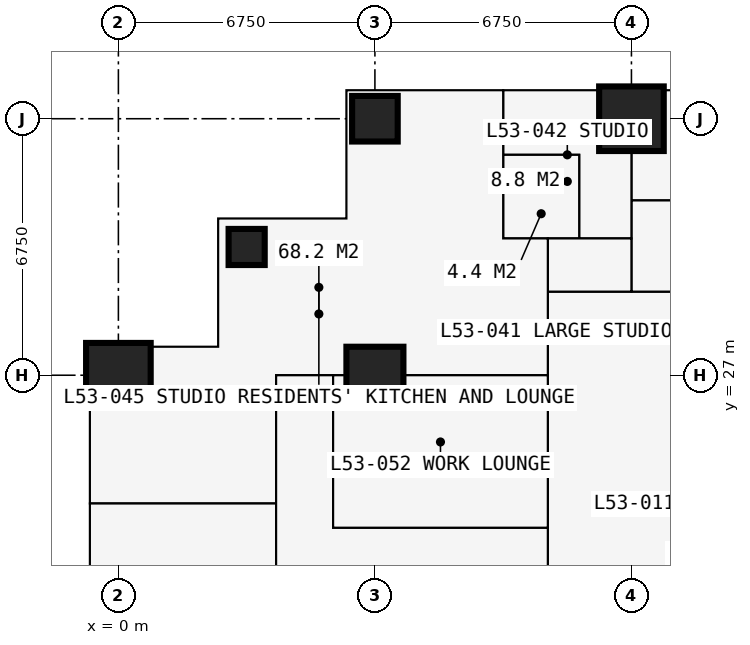
"""IFC4 building model, lengths in metres.
Left out: names, types, materials, properties, quantities, classifications, styles, units other than length and angle.
Written with IfcOpenShell. Run it as: python <this file> out.ifc"""

import sys

from ifc_helpers import new_model, si_unit, direction, frame, frame_2d, origin, origin_2d, place, context, subcontext, project, spatial, rectangle, extrude, element, fill, save


model = new_model("IFC4")
c1 = context("Model", 3, precision=1e-05, world=origin(), true_north=direction((0.0, 1.0)))
c2 = subcontext(c1, "Body", "Model", "MODEL_VIEW")
j1 = project(units=[si_unit("LENGTHUNIT", "METRE"), si_unit("PLANEANGLEUNIT", "RADIAN")], contexts=[c1])
p1 = place(None, origin())
s1 = spatial("IfcSite", under=j1, at=p1, CompositionType="ELEMENT")
p2 = place(p1, origin())
s2 = spatial("IfcBuilding", under=s1, at=p2, CompositionType="ELEMENT")
p3 = place(p2, frame((0.0, 0.0, 196.2)))
s3 = spatial("IfcBuildingStorey", under=s2, at=p3, CompositionType="ELEMENT", Elevation=196.2)
p4 = place(p3, frame((0.0, 27.0, 0.0), z_axis=(0.0, 0.0, 1.0), x_axis=(1.0, 0.0, 0.0)))
e1 = element("IfcColumn", 1, at=p4, inside=s3, PredefinedType="COLUMN", context=c2, shape_type="SweptSolid", body=[
    extrude(rectangle(XDim=1.7, YDim=1.7, at=origin_2d()), origin(), (0.0, 0.0, 1.0), 3.6),
])
p5 = place(p3, frame((3.375, 30.375, 0.0), z_axis=(0.0, 0.0, 1.0), x_axis=(1.0, 0.0, 0.0)))
e2 = element("IfcColumn", 2, at=p5, inside=s3, PredefinedType="COLUMN", context=c2, shape_type="SweptSolid", body=[
    extrude(rectangle(XDim=0.95, YDim=0.95, at=origin_2d()), origin(), (0.0, 0.0, 1.0), 3.6),
])
p6 = place(p3, frame((6.75, 27.0, 0.0), z_axis=(0.0, 0.0, 1.0), x_axis=(1.0, 0.0, 0.0)))
e3 = element("IfcColumn", 3, at=p6, inside=s3, PredefinedType="COLUMN", context=c2, shape_type="SweptSolid", body=[
    extrude(rectangle(XDim=1.5, YDim=1.5, at=origin_2d()), origin(), (0.0, 0.0, 1.0), 3.6),
])
p7 = place(p3, frame((6.75, 33.75, 0.0), z_axis=(0.0, 0.0, 1.0), x_axis=(1.0, 0.0, 0.0)))
e4 = element("IfcColumn", 4, at=p7, inside=s3, PredefinedType="COLUMN", context=c2, shape_type="SweptSolid", body=[
    extrude(rectangle(XDim=1.2, YDim=1.2, at=origin_2d()), origin(), (0.0, 0.0, 1.0), 3.6),
])
p8 = place(p3, frame((13.5, 33.75, 0.0), z_axis=(0.0, 0.0, 1.0), x_axis=(1.0, 0.0, 0.0)))
e5 = element("IfcColumn", 5, at=p8, inside=s3, PredefinedType="COLUMN", context=c2, shape_type="SweptSolid", body=[
    extrude(rectangle(XDim=1.7, YDim=1.7, at=origin_2d()), origin(), (0.0, 0.0, 1.0), 3.6),
])
p9 = place(p3, frame((27.4, 27.0, 0.0), z_axis=(0.0, 0.0, 1.0), x_axis=(-1.0, 0.0, 0.0)))
e6 = element("IfcWall", 6, at=p9, inside=s3, PredefinedType="SHEAR", context=c2, shape_type="SweptSolid", body=[
    extrude(rectangle(XDim=14.3, YDim=1.2, at=frame_2d((7.15, 0.0))), origin(), (0.0, 0.0, 1.0), 3.6),
])
p10 = place(p9, frame((5.225, 0.0, 0.0)))
e7 = element("IfcOpeningElement", 7, at=p10, cuts=e6, PredefinedType="OPENING", context=c2, shape_type="SweptSolid", body=[
    extrude(rectangle(XDim=0.9, YDim=2.2, at=frame_2d((0.45, 1.1))), frame((0.0, 0.61, 0.0), z_axis=(0.0, -1.0, 0.0), x_axis=(1.0, 0.0, 0.0)), (0.0, 0.0, 1.0), 1.22),
])
p11 = place(p9, frame((8.2, 0.0, 0.0)))
e8 = element("IfcOpeningElement", 8, at=p11, cuts=e6, PredefinedType="OPENING", context=c2, shape_type="SweptSolid", body=[
    extrude(rectangle(XDim=1.0, YDim=2.2, at=frame_2d((0.5, 1.1))), frame((0.0, 0.61, 0.0), z_axis=(0.0, -1.0, 0.0), x_axis=(1.0, 0.0, 0.0)), (0.0, 0.0, 1.0), 1.22),
])
p12 = place(p3, frame((13.6, 26.4, 0.0), z_axis=(0.0, 0.0, 1.0), x_axis=(0.0, -1.0, 0.0)))
e9 = element("IfcWall", 9, at=p12, inside=s3, PredefinedType="SHEAR", context=c2, shape_type="SweptSolid", body=[
    extrude(rectangle(XDim=12.3, YDim=1.0, at=frame_2d((6.15, 0.0))), origin(), (0.0, 0.0, 1.0), 3.6),
])
p13 = place(p12, frame((7.45, 0.0, 0.0)))
e10 = element("IfcOpeningElement", 10, at=p13, cuts=e9, PredefinedType="OPENING", context=c2, shape_type="SweptSolid", body=[
    extrude(rectangle(XDim=1.2, YDim=2.2, at=frame_2d((0.6, 1.1))), frame((0.0, 0.51, 0.0), z_axis=(0.0, -1.0, 0.0), x_axis=(1.0, 0.0, 0.0)), (0.0, 0.0, 1.0), 1.02),
])
p14 = place(p3, frame((6.0, 34.5, 0.0), z_axis=(0.0, 0.0, 1.0), x_axis=(0.0, -1.0, 0.0)))
e11 = element("IfcWall", 11, at=p14, inside=s3, PredefinedType="SOLIDWALL", context=c2, shape_type="SweptSolid", body=[
    extrude(rectangle(XDim=3.375, YDim=0.3, at=frame_2d((1.688, 0.0))), origin(), (0.0, 0.0, 1.0), 3.3),
])
p15 = place(p14, frame((0.788, 0.0, 0.6)))
e12 = element("IfcOpeningElement", 12, at=p15, cuts=e11, PredefinedType="OPENING", context=c2, shape_type="SweptSolid", body=[
    extrude(rectangle(XDim=1.8, YDim=2.1, at=frame_2d((0.9, 1.05))), frame((0.0, 0.16, 0.0), z_axis=(0.0, -1.0, 0.0), x_axis=(1.0, 0.0, 0.0)), (0.0, 0.0, 1.0), 0.32),
])
p16 = place(p3, frame((6.0, 31.125, 0.0), z_axis=(0.0, 0.0, 1.0), x_axis=(-1.0, 0.0, 0.0)))
e13 = element("IfcWall", 13, at=p16, inside=s3, PredefinedType="SOLIDWALL", context=c2, shape_type="SweptSolid", body=[
    extrude(rectangle(XDim=3.375, YDim=0.3, at=frame_2d((1.688, 0.0))), origin(), (0.0, 0.0, 1.0), 3.3),
])
p17 = place(p16, frame((0.788, 0.0, 0.6)))
e14 = element("IfcOpeningElement", 14, at=p17, cuts=e13, PredefinedType="OPENING", context=c2, shape_type="SweptSolid", body=[
    extrude(rectangle(XDim=1.8, YDim=2.1, at=frame_2d((0.9, 1.05))), frame((0.0, 0.16, 0.0), z_axis=(0.0, -1.0, 0.0), x_axis=(1.0, 0.0, 0.0)), (0.0, 0.0, 1.0), 0.32),
])
p18 = place(p3, frame((2.625, 31.125, 0.0), z_axis=(0.0, 0.0, 1.0), x_axis=(0.0, -1.0, 0.0)))
e15 = element("IfcWall", 15, at=p18, inside=s3, PredefinedType="SOLIDWALL", context=c2, shape_type="SweptSolid", body=[
    extrude(rectangle(XDim=3.375, YDim=0.3, at=frame_2d((1.688, 0.0))), origin(), (0.0, 0.0, 1.0), 3.3),
])
p19 = place(p18, frame((0.788, 0.0, 0.6)))
e16 = element("IfcOpeningElement", 16, at=p19, cuts=e15, PredefinedType="OPENING", context=c2, shape_type="SweptSolid", body=[
    extrude(rectangle(XDim=1.8, YDim=2.1, at=frame_2d((0.9, 1.05))), frame((0.0, 0.16, 0.0), z_axis=(0.0, -1.0, 0.0), x_axis=(1.0, 0.0, 0.0)), (0.0, 0.0, 1.0), 0.32),
])
p20 = place(p3, frame((2.625, 27.75, 0.0), z_axis=(0.0, 0.0, 1.0), x_axis=(-1.0, 0.0, 0.0)))
e17 = element("IfcWall", 17, at=p20, inside=s3, PredefinedType="SOLIDWALL", context=c2, shape_type="SweptSolid", body=[
    extrude(rectangle(XDim=3.375, YDim=0.3, at=frame_2d((1.688, 0.0))), origin(), (0.0, 0.0, 1.0), 3.3),
])
p21 = place(p20, frame((0.218, 0.0, 0.9)))
e18 = element("IfcOpeningElement", 18, at=p21, cuts=e17, PredefinedType="OPENING", context=c2, shape_type="SweptSolid", body=[
    extrude(rectangle(XDim=1.5, YDim=1.8, at=frame_2d((0.75, 0.9))), frame((0.0, 0.16, 0.0), z_axis=(0.0, -1.0, 0.0), x_axis=(1.0, 0.0, 0.0)), (0.0, 0.0, 1.0), 0.32),
])
p22 = place(p3, frame((-0.734, 23.625, 0.0), z_axis=(0.0, 0.0, 1.0), x_axis=(1.0, 0.0, 0.0)))
e19 = element("IfcWall", 19, at=p22, inside=s3, PredefinedType="PARTITIONING", context=c2, shape_type="SweptSolid", body=[
    extrude(rectangle(XDim=4.884, YDim=0.15, at=frame_2d((2.442, 0.0))), origin(), (0.0, 0.0, 1.0), 3.3),
])
p23 = place(p3, frame((4.15, 10.125, 0.0), z_axis=(0.0, 0.0, 1.0), x_axis=(0.0, 1.0, 0.0)))
e20 = element("IfcWall", 20, at=p23, inside=s3, PredefinedType="PARTITIONING", context=c2, shape_type="SweptSolid", body=[
    extrude(rectangle(XDim=16.875, YDim=0.1, at=frame_2d((8.438, 0.0))), origin(), (0.0, 0.0, 1.0), 3.3),
])
p24 = place(p23, frame((4.2, 0.0, 0.0)))
e21 = element("IfcOpeningElement", 21, at=p24, cuts=e20, PredefinedType="OPENING", context=c2, shape_type="SweptSolid", body=[
    extrude(rectangle(XDim=0.95, YDim=2.2, at=frame_2d((0.475, 1.1))), frame((0.0, 0.06, 0.0), z_axis=(0.0, -1.0, 0.0), x_axis=(1.0, 0.0, 0.0)), (0.0, 0.0, 1.0), 0.12),
])
p25 = place(p23, frame((10.95, 0.0, 0.0)))
e22 = element("IfcOpeningElement", 22, at=p25, cuts=e20, PredefinedType="OPENING", context=c2, shape_type="SweptSolid", body=[
    extrude(rectangle(XDim=0.95, YDim=2.2, at=frame_2d((0.475, 1.1))), frame((0.0, 0.06, 0.0), z_axis=(0.0, -1.0, 0.0), x_axis=(1.0, 0.0, 0.0)), (0.0, 0.0, 1.0), 0.12),
])
p26 = place(p3, frame((4.15, 27.0, 0.0), z_axis=(0.0, 0.0, 1.0), x_axis=(1.0, 0.0, 0.0)))
e23 = element("IfcWall", 23, at=p26, inside=s3, PredefinedType="PARTITIONING", context=c2, shape_type="SweptSolid", body=[
    extrude(rectangle(XDim=7.15, YDim=0.15, at=frame_2d((3.575, 0.0))), origin(), (0.0, 0.0, 1.0), 2.802),
])
p27 = place(p3, frame((5.65, 22.988, 0.0), z_axis=(0.0, 0.0, 1.0), x_axis=(0.0, 1.0, 0.0)))
e24 = element("IfcWall", 24, at=p27, inside=s3, PredefinedType="PARTITIONING", context=c2, shape_type="SweptSolid", body=[
    extrude(rectangle(XDim=4.012, YDim=0.15, at=frame_2d((2.006, 0.0))), origin(), (0.0, 0.0, 1.0), 3.3),
])
p28 = place(p3, frame((5.65, 22.988, 0.0), z_axis=(0.0, 0.0, 1.0), x_axis=(1.0, 0.0, 0.0)))
e25 = element("IfcWall", 25, at=p28, inside=s3, PredefinedType="PARTITIONING", context=c2, shape_type="SweptSolid", body=[
    extrude(rectangle(XDim=5.65, YDim=0.15, at=frame_2d((2.825, 0.0))), origin(), (0.0, 0.0, 1.0), 3.3),
])
p29 = place(p28, frame((2.35, 0.0, 0.0)))
e26 = element("IfcOpeningElement", 26, at=p29, cuts=e25, PredefinedType="OPENING", context=c2, shape_type="SweptSolid", body=[
    extrude(rectangle(XDim=0.95, YDim=2.2, at=frame_2d((0.475, 1.1))), frame((0.0, 0.085, 0.0), z_axis=(0.0, -1.0, 0.0), x_axis=(1.0, 0.0, 0.0)), (0.0, 0.0, 1.0), 0.17),
])
p30 = place(p3, frame((10.125, 30.6, 0.0), z_axis=(0.0, 0.0, 1.0), x_axis=(0.0, 1.0, 0.0)))
e27 = element("IfcWall", 27, at=p30, inside=s3, PredefinedType="PARTITIONING", context=c2, shape_type="SweptSolid", body=[
    extrude(rectangle(XDim=3.884, YDim=0.1, at=frame_2d((1.942, 0.0))), origin(), (0.0, 0.0, 1.0), 3.3),
])
p31 = place(p3, frame((10.125, 30.6, 0.0), z_axis=(0.0, 0.0, 1.0), x_axis=(1.0, 0.0, 0.0)))
e28 = element("IfcWall", 28, at=p31, inside=s3, PredefinedType="PARTITIONING", context=c2, shape_type="SweptSolid", body=[
    extrude(rectangle(XDim=3.375, YDim=0.1, at=frame_2d((1.688, 0.0))), origin(), (0.0, 0.0, 1.0), 3.3),
])
p32 = place(p31, frame((2.2, 0.0, 0.0)))
e29 = element("IfcOpeningElement", 29, at=p32, cuts=e28, PredefinedType="OPENING", context=c2, shape_type="SweptSolid", body=[
    extrude(rectangle(XDim=0.95, YDim=2.2, at=frame_2d((0.475, 1.1))), frame((0.0, 0.06, 0.0), z_axis=(0.0, -1.0, 0.0), x_axis=(1.0, 0.0, 0.0)), (0.0, 0.0, 1.0), 0.12),
])
p33 = place(p3, frame((10.125, 32.8, 0.0), z_axis=(0.0, 0.0, 1.0), x_axis=(1.0, 0.0, 0.0)))
e30 = element("IfcWall", 30, at=p33, inside=s3, PredefinedType="PARTITIONING", context=c2, shape_type="SweptSolid", body=[
    extrude(rectangle(XDim=2.0, YDim=0.1, at=frame_2d((1.0, 0.0))), origin(), (0.0, 0.0, 1.0), 3.3),
])
p34 = place(p3, frame((11.3, 11.3, 0.0), z_axis=(0.0, 0.0, 1.0), x_axis=(0.0, 1.0, 0.0)))
e31 = element("IfcWall", 31, at=p34, inside=s3, PredefinedType="PARTITIONING", context=c2, shape_type="SweptSolid", body=[
    extrude(rectangle(XDim=19.3, YDim=0.15, at=frame_2d((9.65, 0.0))), origin(), (0.0, 0.0, 1.0), 3.3),
])
p35 = place(p34, frame((18.1, 0.0, 0.0)))
e32 = element("IfcOpeningElement", 32, at=p35, cuts=e31, PredefinedType="OPENING", context=c2, shape_type="SweptSolid", body=[
    extrude(rectangle(XDim=1.0, YDim=2.2, at=frame_2d((0.5, 1.1))), frame((0.0, 0.085, 0.0), z_axis=(0.0, -1.0, 0.0), x_axis=(1.0, 0.0, 0.0)), (0.0, 0.0, 1.0), 0.17),
])
p36 = place(p34, frame((10.137, 0.0, 0.0)))
e33 = element("IfcOpeningElement", 33, at=p36, cuts=e31, PredefinedType="OPENING", context=c2, shape_type="SweptSolid", body=[
    extrude(rectangle(XDim=1.0, YDim=2.2, at=frame_2d((0.5, 1.1))), frame((0.0, 0.085, 0.0), z_axis=(0.0, -1.0, 0.0), x_axis=(1.0, 0.0, 0.0)), (0.0, 0.0, 1.0), 0.17),
])
p37 = place(p3, frame((11.3, 29.2, 0.0), z_axis=(0.0, 0.0, 1.0), x_axis=(1.0, 0.0, 0.0)))
e34 = element("IfcWall", 34, at=p37, inside=s3, PredefinedType="PARTITIONING", context=c2, shape_type="SweptSolid", body=[
    extrude(rectangle(XDim=19.809, YDim=0.15, at=frame_2d((9.904, 0.0))), origin(), (0.0, 0.0, 1.0), 3.3),
])
p38 = place(p37, frame((12.9, 0.0, 0.0)))
e35 = element("IfcOpeningElement", 35, at=p38, cuts=e34, PredefinedType="OPENING", context=c2, shape_type="SweptSolid", body=[
    extrude(rectangle(XDim=1.0, YDim=2.2, at=frame_2d((0.5, 1.1))), frame((0.0, 0.085, 0.0), z_axis=(0.0, -1.0, 0.0), x_axis=(1.0, 0.0, 0.0)), (0.0, 0.0, 1.0), 0.17),
])
p39 = place(p37, frame((6.4, 0.0, 0.0)))
e36 = element("IfcOpeningElement", 36, at=p39, cuts=e34, PredefinedType="OPENING", context=c2, shape_type="SweptSolid", body=[
    extrude(rectangle(XDim=0.95, YDim=2.2, at=frame_2d((0.475, 1.1))), frame((0.0, 0.085, 0.0), z_axis=(0.0, -1.0, 0.0), x_axis=(1.0, 0.0, 0.0)), (0.0, 0.0, 1.0), 0.17),
])
p40 = place(p37, frame((0.6, 0.0, 0.0)))
e37 = element("IfcOpeningElement", 37, at=p40, cuts=e34, PredefinedType="OPENING", context=c2, shape_type="SweptSolid", body=[
    extrude(rectangle(XDim=1.0, YDim=2.2, at=frame_2d((0.5, 1.1))), frame((0.0, 0.085, 0.0), z_axis=(0.0, -1.0, 0.0), x_axis=(1.0, 0.0, 0.0)), (0.0, 0.0, 1.0), 0.17),
])
p41 = place(p3, frame((12.125, 30.6, 0.0), z_axis=(0.0, 0.0, 1.0), x_axis=(0.0, 1.0, 0.0)))
e38 = element("IfcWall", 38, at=p41, inside=s3, PredefinedType="PARTITIONING", context=c2, shape_type="SweptSolid", body=[
    extrude(rectangle(XDim=2.2, YDim=0.1, at=frame_2d((1.1, 0.0))), origin(), (0.0, 0.0, 1.0), 3.3),
])
p42 = place(p41, frame((0.65, 0.0, 0.0)))
e39 = element("IfcOpeningElement", 39, at=p42, cuts=e38, PredefinedType="OPENING", context=c2, shape_type="SweptSolid", body=[
    extrude(rectangle(XDim=0.9, YDim=2.2, at=frame_2d((0.45, 1.1))), frame((0.0, 0.06, 0.0), z_axis=(0.0, -1.0, 0.0), x_axis=(1.0, 0.0, 0.0)), (0.0, 0.0, 1.0), 0.12),
])
p43 = place(p3, frame((13.5, 29.2, 0.0), z_axis=(0.0, 0.0, 1.0), x_axis=(0.0, 1.0, 0.0)))
e40 = element("IfcWall", 40, at=p43, inside=s3, PredefinedType="PARTITIONING", context=c2, shape_type="SweptSolid", body=[
    extrude(rectangle(XDim=5.284, YDim=0.175, at=frame_2d((2.642, 0.0))), origin(), (0.0, 0.0, 1.0), 2.802),
])
p44 = place(p3, frame((13.5, 31.6, 0.0), z_axis=(0.0, 0.0, 1.0), x_axis=(1.0, 0.0, 0.0)))
e41 = element("IfcWall", 41, at=p44, inside=s3, PredefinedType="PARTITIONING", context=c2, shape_type="SweptSolid", body=[
    extrude(rectangle(XDim=2.6, YDim=0.1, at=frame_2d((1.3, 0.0))), origin(), (0.0, 0.0, 1.0), 3.3),
])
p45 = place(p44, frame((0.85, 0.0, 0.0)))
e42 = element("IfcOpeningElement", 42, at=p45, cuts=e41, PredefinedType="OPENING", context=c2, shape_type="SweptSolid", body=[
    extrude(rectangle(XDim=0.9, YDim=2.2, at=frame_2d((0.45, 1.1))), frame((0.0, 0.06, 0.0), z_axis=(0.0, -1.0, 0.0), x_axis=(1.0, 0.0, 0.0)), (0.0, 0.0, 1.0), 0.12),
])
p46 = place(p15, origin())
e43 = element("IfcWindow", 43, at=p46, inside=s3, PartitioningType="SINGLE_PANEL", PredefinedType="WINDOW", context=c2, shape_type="SweptSolid", body=[
    extrude(rectangle(XDim=1.8, YDim=2.1, at=frame_2d((0.9, 1.05))), frame((0.0, 0.03, 0.0), z_axis=(0.0, -1.0, 0.0), x_axis=(1.0, 0.0, 0.0)), (0.0, 0.0, 1.0), 0.06),
])
fill(e12, e43)
p47 = place(p17, origin())
e44 = element("IfcWindow", 44, at=p47, inside=s3, PartitioningType="SINGLE_PANEL", PredefinedType="WINDOW", context=c2, shape_type="SweptSolid", body=[
    extrude(rectangle(XDim=1.8, YDim=2.1, at=frame_2d((0.9, 1.05))), frame((0.0, 0.03, 0.0), z_axis=(0.0, -1.0, 0.0), x_axis=(1.0, 0.0, 0.0)), (0.0, 0.0, 1.0), 0.06),
])
fill(e14, e44)
p48 = place(p19, origin())
e45 = element("IfcWindow", 45, at=p48, inside=s3, PartitioningType="SINGLE_PANEL", PredefinedType="WINDOW", context=c2, shape_type="SweptSolid", body=[
    extrude(rectangle(XDim=1.8, YDim=2.1, at=frame_2d((0.9, 1.05))), frame((0.0, 0.03, 0.0), z_axis=(0.0, -1.0, 0.0), x_axis=(1.0, 0.0, 0.0)), (0.0, 0.0, 1.0), 0.06),
])
fill(e16, e45)
p49 = place(p21, origin())
e46 = element("IfcWindow", 46, at=p49, inside=s3, PartitioningType="SINGLE_PANEL", PredefinedType="WINDOW", context=c2, shape_type="SweptSolid", body=[
    extrude(rectangle(XDim=1.5, YDim=1.8, at=frame_2d((0.75, 0.9))), frame((0.0, 0.03, 0.0), z_axis=(0.0, -1.0, 0.0), x_axis=(1.0, 0.0, 0.0)), (0.0, 0.0, 1.0), 0.06),
])
fill(e18, e46)
p50 = place(p45, origin())
e47 = element("IfcDoor", 47, at=p50, inside=s3, OperationType="SINGLE_SWING_RIGHT", PredefinedType="DOOR", context=c2, shape_type="SweptSolid", body=[
    extrude(rectangle(XDim=0.9, YDim=2.2, at=frame_2d((0.45, 1.1))), frame((0.0, 0.025, 0.0), z_axis=(0.0, -1.0, 0.0), x_axis=(1.0, 0.0, 0.0)), (0.0, 0.0, 1.0), 0.05),
])
fill(e42, e47)
p51 = place(p32, origin())
e48 = element("IfcDoor", 48, at=p51, inside=s3, OperationType="SINGLE_SWING_LEFT", PredefinedType="DOOR", context=c2, shape_type="SweptSolid", body=[
    extrude(rectangle(XDim=0.95, YDim=2.2, at=frame_2d((0.475, 1.1))), frame((0.0, 0.025, 0.0), z_axis=(0.0, -1.0, 0.0), x_axis=(1.0, 0.0, 0.0)), (0.0, 0.0, 1.0), 0.05),
])
fill(e29, e48)
p52 = place(p42, origin())
e49 = element("IfcDoor", 49, at=p52, inside=s3, OperationType="SINGLE_SWING_RIGHT", PredefinedType="DOOR", context=c2, shape_type="SweptSolid", body=[
    extrude(rectangle(XDim=0.9, YDim=2.2, at=frame_2d((0.45, 1.1))), frame((0.0, 0.025, 0.0), z_axis=(0.0, -1.0, 0.0), x_axis=(1.0, 0.0, 0.0)), (0.0, 0.0, 1.0), 0.05),
])
fill(e39, e49)
p53 = place(p40, origin())
e50 = element("IfcDoor", 50, at=p53, inside=s3, OperationType="SINGLE_SWING_LEFT", PredefinedType="DOOR", context=c2, shape_type="SweptSolid", body=[
    extrude(rectangle(XDim=1.0, YDim=2.2, at=frame_2d((0.5, 1.1))), frame((0.0, 0.025, 0.0), z_axis=(0.0, -1.0, 0.0), x_axis=(1.0, 0.0, 0.0)), (0.0, 0.0, 1.0), 0.05),
])
fill(e37, e50)
p54 = place(p35, origin())
e51 = element("IfcDoor", 51, at=p54, inside=s3, OperationType="SINGLE_SWING_LEFT", PredefinedType="DOOR", context=c2, shape_type="SweptSolid", body=[
    extrude(rectangle(XDim=1.0, YDim=2.2, at=frame_2d((0.5, 1.1))), frame((0.0, 0.025, 0.0), z_axis=(0.0, -1.0, 0.0), x_axis=(1.0, 0.0, 0.0)), (0.0, 0.0, 1.0), 0.05),
])
fill(e32, e51)
p55 = place(p25, origin())
e52 = element("IfcDoor", 52, at=p55, inside=s3, OperationType="SINGLE_SWING_LEFT", PredefinedType="DOOR", context=c2, shape_type="SweptSolid", body=[
    extrude(rectangle(XDim=0.95, YDim=2.2, at=frame_2d((0.475, 1.1))), frame((0.0, 0.025, 0.0), z_axis=(0.0, -1.0, 0.0), x_axis=(1.0, 0.0, 0.0)), (0.0, 0.0, 1.0), 0.05),
])
fill(e22, e52)
p56 = place(p36, origin())
e53 = element("IfcDoor", 53, at=p56, inside=s3, OperationType="SINGLE_SWING_LEFT", PredefinedType="DOOR", context=c2, shape_type="SweptSolid", body=[
    extrude(rectangle(XDim=1.0, YDim=2.2, at=frame_2d((0.5, 1.1))), frame((0.0, 0.025, 0.0), z_axis=(0.0, -1.0, 0.0), x_axis=(1.0, 0.0, 0.0)), (0.0, 0.0, 1.0), 0.05),
])
fill(e33, e53)
p57 = place(p29, origin())
e54 = element("IfcDoor", 54, at=p57, inside=s3, OperationType="SINGLE_SWING_LEFT", PredefinedType="DOOR", context=c2, shape_type="SweptSolid", body=[
    extrude(rectangle(XDim=0.95, YDim=2.2, at=frame_2d((0.475, 1.1))), frame((0.0, 0.025, 0.0), z_axis=(0.0, -1.0, 0.0), x_axis=(1.0, 0.0, 0.0)), (0.0, 0.0, 1.0), 0.05),
])
fill(e26, e54)
save(model, sys.argv[1])
